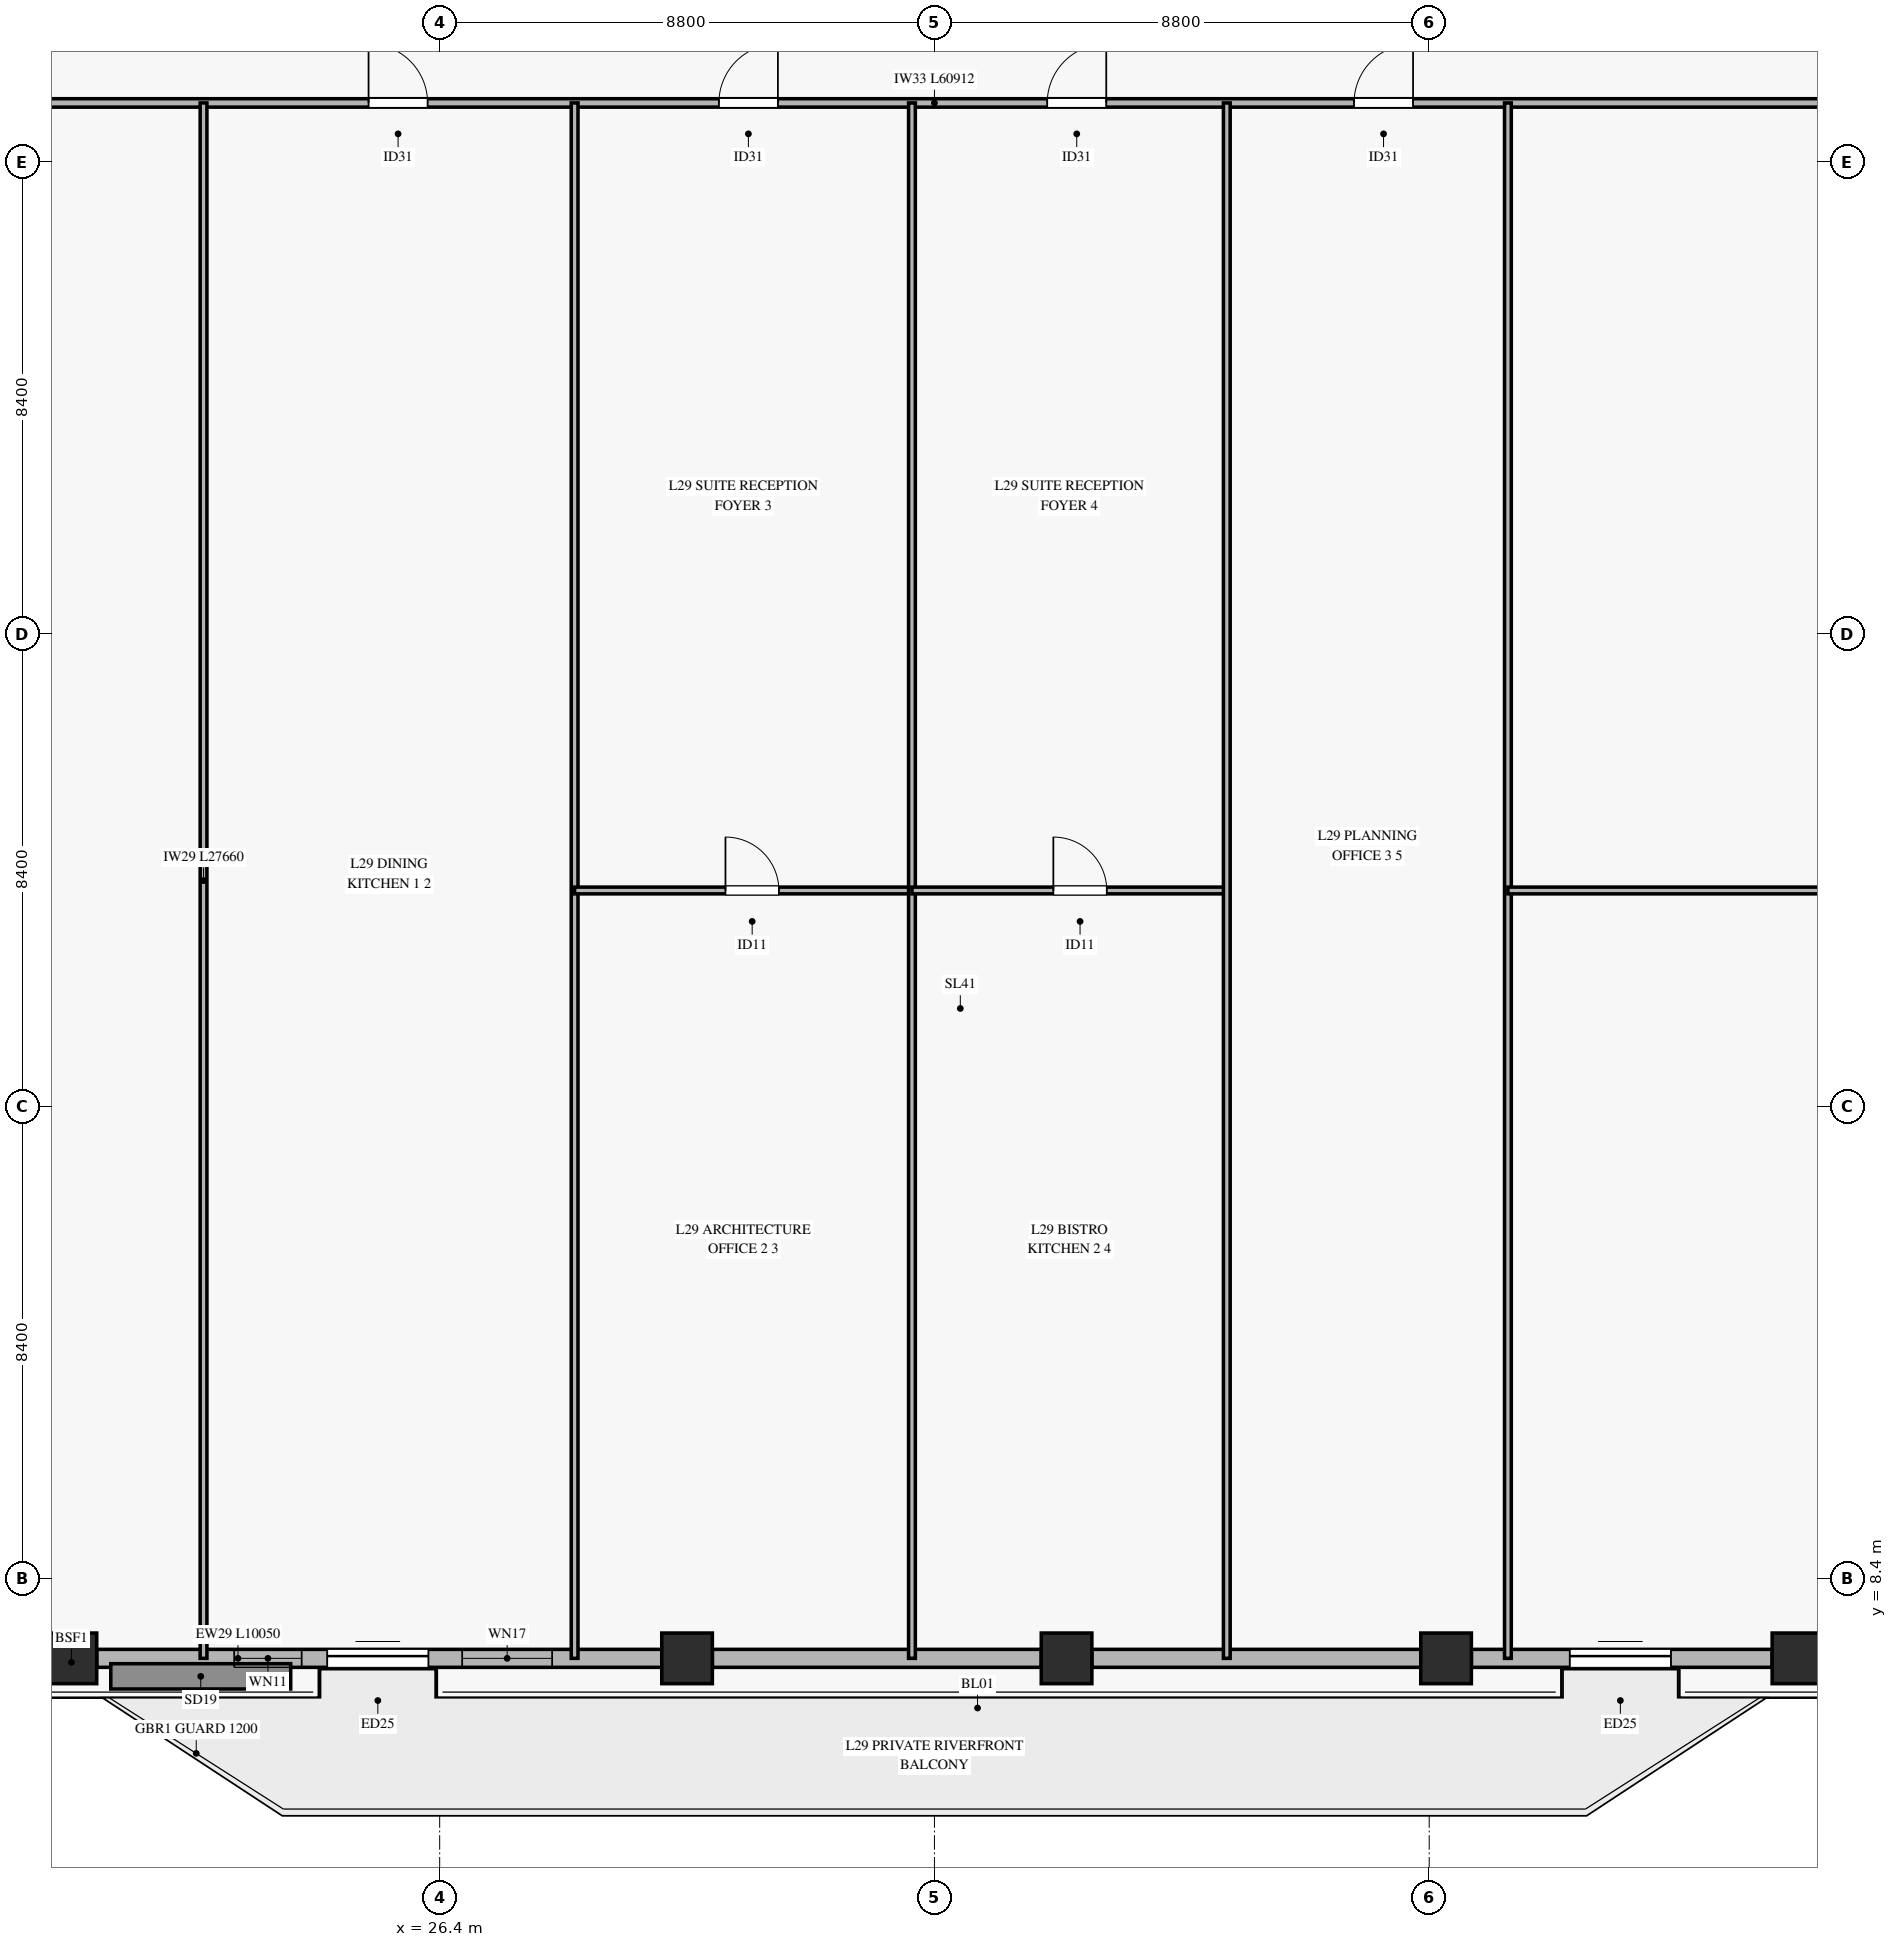
"""IFC4 building model, lengths in metres.
Left out: names, types, materials, properties, quantities, classifications, styles, units other than length and angle.
Written with IfcOpenShell. Run it as: python <this file> out.ifc"""

import sys

from ifc_helpers import new_model, si_unit, direction, frame, frame_2d, origin, origin_2d, place, context, subcontext, project, spatial, rectangle, hollow_rectangle, extrude, source, transform, mapped, element, fill, save


model = new_model("IFC4")
c1 = context("Model", 3, precision=1e-05, world=origin(), true_north=direction((0.0, 1.0)))
c2 = subcontext(c1, "Body", "Model", "MODEL_VIEW")
j1 = project(units=[si_unit("LENGTHUNIT", "METRE"), si_unit("PLANEANGLEUNIT", "RADIAN")], contexts=[c1])
p1 = place(None, origin())
s1 = spatial("IfcSite", under=j1, at=p1, CompositionType="ELEMENT")
p2 = place(p1, origin())
s2 = spatial("IfcBuilding", under=s1, at=p2, CompositionType="ELEMENT")
p3 = place(p2, frame((0.0, 0.0, 119.2)))
s3 = spatial("IfcBuildingStorey", under=s2, at=p3, CompositionType="ELEMENT", Elevation=119.2)
m1 = source(origin(), c2, "Body", "SweptSolid", [
    extrude(hollow_rectangle(XDim=0.9, YDim=0.9, WallThickness=0.04, at=origin_2d()), origin(), (0.0, 0.0, 1.0), 3.718),
])
for number, where, z_axis, x_axis in (
    (1, (19.85, 6.99, 0.0), (0.0, 0.142, 0.99), (-1.0, 0.0, 0.0)),
    (2, (30.8, 6.99, 0.0), (0.0, 0.142, 0.99), (-1.0, 0.0, 0.0)),
    (3, (37.55, 6.99, 0.0), (0.0, 0.142, 0.99), (-1.0, 0.0, 0.0)),
    (4, (44.3, 6.99, 0.0), (0.0, 0.142, 0.99), (-1.0, 0.0, 0.0)),
    (5, (50.55, 6.99, 0.0), (0.0, 0.142, 0.99), (-1.0, 0.0, 0.0)),
):
    element("IfcColumn", number, at=place(p3, frame(where, z_axis=z_axis, x_axis=x_axis)), inside=s3, PredefinedType="COLUMN", context=c2, shape_type="MappedRepresentation", body=[
        mapped(m1, transform((0.0, 0.0, 0.0), x_axis=(1.0, 0.0, 0.0), y_axis=(0.0, 1.0, 0.0), z_axis=(0.0, 0.0, 1.0), scale=1.0)),
    ])
p4 = place(p3, frame((20.3, 6.99, 0.0), z_axis=(0.0, 0.0, 1.0), x_axis=(1.0, 0.0, 0.0)))
e6 = element("IfcWall", 6, at=p4, inside=s3, PredefinedType="SOLIDWALL", context=c2, shape_type="SweptSolid", body=[
    extrude(rectangle(XDim=10.05, YDim=0.32, at=frame_2d((5.025, 0.0))), origin(), (0.0, 0.0, 1.0), 3.16),
])
p5 = place(p4, frame((4.1, 0.0, 0.0)))
e7 = element("IfcOpeningElement", 7, at=p5, cuts=e6, PredefinedType="OPENING", context=c2, shape_type="SweptSolid", body=[
    extrude(rectangle(XDim=1.8, YDim=2.25, at=frame_2d((0.9, 1.125))), frame((0.0, 0.17, 0.0), z_axis=(0.0, -1.0, 0.0), x_axis=(1.0, 0.0, 0.0)), (0.0, 0.0, 1.0), 0.34),
])
p6 = place(p4, frame((2.445, 0.0, 0.45)))
e8 = element("IfcOpeningElement", 8, at=p6, cuts=e6, PredefinedType="OPENING", context=c2, shape_type="SweptSolid", body=[
    extrude(rectangle(XDim=1.2, YDim=2.0, at=frame_2d((0.6, 1.0))), frame((0.0, 0.17, 0.0), z_axis=(0.0, -1.0, 0.0), x_axis=(1.0, 0.0, 0.0)), (0.0, 0.0, 1.0), 0.34),
])
p7 = place(p4, frame((6.5, 0.0, 0.45)))
e9 = element("IfcOpeningElement", 9, at=p7, cuts=e6, PredefinedType="OPENING", context=c2, shape_type="SweptSolid", body=[
    extrude(rectangle(XDim=1.6, YDim=2.0, at=frame_2d((0.8, 1.0))), frame((0.0, 0.17, 0.0), z_axis=(0.0, -1.0, 0.0), x_axis=(1.0, 0.0, 0.0)), (0.0, 0.0, 1.0), 0.34),
])
for number, where, z_axis, x_axis in (
    (10, (31.25, 6.99, 0.0), (0.0, 0.0, 1.0), (1.0, 0.0, 0.0)),
    (11, (38.0, 6.99, 0.0), (0.0, 0.0, 1.0), (1.0, 0.0, 0.0)),
):
    element("IfcWall", number, at=place(p3, frame(where, z_axis=z_axis, x_axis=x_axis)), inside=s3, PredefinedType="SOLIDWALL", context=c2, shape_type="SweptSolid", body=[
        extrude(rectangle(XDim=5.85, YDim=0.32, at=frame_2d((2.925, 0.0))), origin(), (0.0, 0.0, 1.0), 3.16),
    ])
p8 = place(p3, frame((44.75, 6.99, 0.0), z_axis=(0.0, 0.0, 1.0), x_axis=(1.0, 0.0, 0.0)))
e12 = element("IfcWall", 12, at=p8, inside=s3, PredefinedType="SOLIDWALL", context=c2, shape_type="SweptSolid", body=[
    extrude(rectangle(XDim=5.35, YDim=0.32, at=frame_2d((2.675, 0.0))), origin(), (0.0, 0.0, 1.0), 3.16),
])
p9 = place(p8, frame((1.75, 0.0, 0.0)))
e13 = element("IfcOpeningElement", 13, at=p9, cuts=e12, PredefinedType="OPENING", context=c2, shape_type="SweptSolid", body=[
    extrude(rectangle(XDim=1.8, YDim=2.25, at=frame_2d((0.9, 1.125))), frame((0.0, 0.17, 0.0), z_axis=(0.0, -1.0, 0.0), x_axis=(1.0, 0.0, 0.0)), (0.0, 0.0, 1.0), 0.34),
])
p10 = place(p3, frame((4.744, 34.65, 0.0), z_axis=(0.0, 0.0, 1.0), x_axis=(1.0, 0.0, 0.0)))
e14 = element("IfcWall", 14, at=p10, inside=s3, PredefinedType="PARTITIONING", context=c2, shape_type="SweptSolid", body=[
    extrude(rectangle(XDim=60.912, YDim=0.15, at=frame_2d((30.456, 0.0))), origin(), (0.0, 0.0, 1.0), 2.765),
])
p11 = place(p10, frame((7.747, 0.0, 0.0)))
e15 = element("IfcOpeningElement", 15, at=p11, cuts=e14, PredefinedType="OPENING", context=c2, shape_type="SweptSolid", body=[
    extrude(rectangle(XDim=1.05, YDim=2.15, at=frame_2d((0.525, 1.075))), frame((0.0, 0.085, 0.0), z_axis=(0.0, -1.0, 0.0), x_axis=(1.0, 0.0, 0.0)), (0.0, 0.0, 1.0), 0.17),
])
p12 = place(p10, frame((20.391, 0.0, 0.0)))
e16 = element("IfcOpeningElement", 16, at=p12, cuts=e14, PredefinedType="OPENING", context=c2, shape_type="SweptSolid", body=[
    extrude(rectangle(XDim=1.05, YDim=2.15, at=frame_2d((0.525, 1.075))), frame((0.0, 0.085, 0.0), z_axis=(0.0, -1.0, 0.0), x_axis=(1.0, 0.0, 0.0)), (0.0, 0.0, 1.0), 0.17),
])
p13 = place(p10, frame((26.622, 0.0, 0.0)))
e17 = element("IfcOpeningElement", 17, at=p13, cuts=e14, PredefinedType="OPENING", context=c2, shape_type="SweptSolid", body=[
    extrude(rectangle(XDim=1.05, YDim=2.15, at=frame_2d((0.525, 1.075))), frame((0.0, 0.085, 0.0), z_axis=(0.0, -1.0, 0.0), x_axis=(1.0, 0.0, 0.0)), (0.0, 0.0, 1.0), 0.17),
])
p14 = place(p10, frame((32.462, 0.0, 0.0)))
e18 = element("IfcOpeningElement", 18, at=p14, cuts=e14, PredefinedType="OPENING", context=c2, shape_type="SweptSolid", body=[
    extrude(rectangle(XDim=1.05, YDim=2.15, at=frame_2d((0.525, 1.075))), frame((0.0, 0.085, 0.0), z_axis=(0.0, -1.0, 0.0), x_axis=(1.0, 0.0, 0.0)), (0.0, 0.0, 1.0), 0.17),
])
p15 = place(p10, frame((37.919, 0.0, 0.0)))
e19 = element("IfcOpeningElement", 19, at=p15, cuts=e14, PredefinedType="OPENING", context=c2, shape_type="SweptSolid", body=[
    extrude(rectangle(XDim=1.05, YDim=2.15, at=frame_2d((0.525, 1.075))), frame((0.0, 0.085, 0.0), z_axis=(0.0, -1.0, 0.0), x_axis=(1.0, 0.0, 0.0)), (0.0, 0.0, 1.0), 0.17),
])
p16 = place(p10, frame((48.75, 0.0, 0.0)))
e20 = element("IfcOpeningElement", 20, at=p16, cuts=e14, PredefinedType="OPENING", context=c2, shape_type="SweptSolid", body=[
    extrude(rectangle(XDim=1.05, YDim=2.15, at=frame_2d((0.525, 1.075))), frame((0.0, 0.085, 0.0), z_axis=(0.0, -1.0, 0.0), x_axis=(1.0, 0.0, 0.0)), (0.0, 0.0, 1.0), 0.17),
])
for number, where, z_axis, x_axis in (
    (21, (22.2, 6.99, 0.0), (0.0, 0.0, 1.0), (0.0, 1.0, 0.0)),
    (22, (28.8, 6.99, 0.0), (0.0, 0.0, 1.0), (0.0, 1.0, 0.0)),
):
    element("IfcWall", number, at=place(p3, frame(where, z_axis=z_axis, x_axis=x_axis)), inside=s3, PredefinedType="PARTITIONING", context=c2, shape_type="SweptSolid", body=[
        extrude(rectangle(XDim=27.66, YDim=0.12, at=frame_2d((13.83, 0.0))), origin(), (0.0, 0.0, 1.0), 3.165),
    ])
p17 = place(p3, frame((28.8, 20.645, 0.0), z_axis=(0.0, 0.0, 1.0), x_axis=(1.0, 0.0, 0.0)))
e23 = element("IfcWall", 23, at=p17, inside=s3, PredefinedType="PARTITIONING", context=c2, shape_type="SweptSolid", body=[
    extrude(rectangle(XDim=6.0, YDim=0.12, at=frame_2d((3.0, 0.0))), origin(), (0.0, 0.0, 1.0), 2.765),
])
p18 = place(p17, frame((2.683, 0.0, 0.0)))
e24 = element("IfcOpeningElement", 24, at=p18, cuts=e23, PredefinedType="OPENING", context=c2, shape_type="SweptSolid", body=[
    extrude(rectangle(XDim=0.95, YDim=2.1, at=frame_2d((0.475, 1.05))), frame((0.0, 0.07, 0.0), z_axis=(0.0, -1.0, 0.0), x_axis=(1.0, 0.0, 0.0)), (0.0, 0.0, 1.0), 0.14),
])
p19 = place(p3, frame((34.8, 6.99, 0.0), z_axis=(0.0, 0.0, 1.0), x_axis=(0.0, 1.0, 0.0)))
e25 = element("IfcWall", 25, at=p19, inside=s3, PredefinedType="PARTITIONING", context=c2, shape_type="SweptSolid", body=[
    extrude(rectangle(XDim=27.66, YDim=0.12, at=frame_2d((13.83, 0.0))), origin(), (0.0, 0.0, 1.0), 3.165),
])
p20 = place(p3, frame((34.8, 20.645, 0.0), z_axis=(0.0, 0.0, 1.0), x_axis=(1.0, 0.0, 0.0)))
e26 = element("IfcWall", 26, at=p20, inside=s3, PredefinedType="PARTITIONING", context=c2, shape_type="SweptSolid", body=[
    extrude(rectangle(XDim=5.6, YDim=0.12, at=frame_2d((2.8, 0.0))), origin(), (0.0, 0.0, 1.0), 2.765),
])
p21 = place(p20, frame((2.515, 0.0, 0.0)))
e27 = element("IfcOpeningElement", 27, at=p21, cuts=e26, PredefinedType="OPENING", context=c2, shape_type="SweptSolid", body=[
    extrude(rectangle(XDim=0.95, YDim=2.1, at=frame_2d((0.475, 1.05))), frame((0.0, 0.07, 0.0), z_axis=(0.0, -1.0, 0.0), x_axis=(1.0, 0.0, 0.0)), (0.0, 0.0, 1.0), 0.14),
])
for number, where, z_axis, x_axis in (
    (28, (40.4, 6.99, 0.0), (0.0, 0.0, 1.0), (0.0, 1.0, 0.0)),
    (29, (45.4, 6.99, 0.0), (0.0, 0.0, 1.0), (0.0, 1.0, 0.0)),
):
    element("IfcWall", number, at=place(p3, frame(where, z_axis=z_axis, x_axis=x_axis)), inside=s3, PredefinedType="PARTITIONING", context=c2, shape_type="SweptSolid", body=[
        extrude(rectangle(XDim=27.66, YDim=0.12, at=frame_2d((13.83, 0.0))), origin(), (0.0, 0.0, 1.0), 3.165),
    ])
p22 = place(p3, frame((45.4, 20.645, 0.0), z_axis=(0.0, 0.0, 1.0), x_axis=(1.0, 0.0, 0.0)))
e30 = element("IfcWall", 30, at=p22, inside=s3, PredefinedType="PARTITIONING", context=c2, shape_type="SweptSolid", body=[
    extrude(rectangle(XDim=20.256, YDim=0.12, at=frame_2d((10.128, 0.0))), origin(), (0.0, 0.0, 1.0), 2.765),
])
p23 = place(p22, frame((8.488, 0.0, 0.0)))
e31 = element("IfcOpeningElement", 31, at=p23, cuts=e30, PredefinedType="OPENING", context=c2, shape_type="SweptSolid", body=[
    extrude(rectangle(XDim=0.95, YDim=2.1, at=frame_2d((0.475, 1.05))), frame((0.0, 0.07, 0.0), z_axis=(0.0, -1.0, 0.0), x_axis=(1.0, 0.0, 0.0)), (0.0, 0.0, 1.0), 0.14),
])
m2 = source(origin(), c2, "Body", "SweptSolid", [
    extrude(rectangle(XDim=1.8, YDim=2.25, at=frame_2d((0.9, 1.125))), frame((0.0, 0.025, 0.0), z_axis=(0.0, -1.0, 0.0), x_axis=(1.0, 0.0, 0.0)), (0.0, 0.0, 1.0), 0.05),
])
p24 = place(p5, origin())
e32 = element("IfcDoor", 32, at=p24, inside=s3, OperationType="SLIDING_TO_LEFT", PredefinedType="DOOR", context=c2, shape_type="MappedRepresentation", body=[
    mapped(m2, transform((0.0, 0.0, 0.0), x_axis=(1.0, 0.0, 0.0), y_axis=(0.0, 1.0, 0.0), z_axis=(0.0, 0.0, 1.0), scale=1.0)),
])
fill(e7, e32)
m3 = source(origin(), c2, "Body", "SweptSolid", [
    extrude(rectangle(XDim=1.2, YDim=2.0, at=frame_2d((0.6, 1.0))), frame((0.0, 0.03, 0.0), z_axis=(0.0, -1.0, 0.0), x_axis=(1.0, 0.0, 0.0)), (0.0, 0.0, 1.0), 0.06),
])
p25 = place(p6, origin())
e33 = element("IfcWindow", 33, at=p25, inside=s3, PartitioningType="SINGLE_PANEL", PredefinedType="WINDOW", context=c2, shape_type="MappedRepresentation", body=[
    mapped(m3, transform((0.0, 0.0, 0.0), x_axis=(1.0, 0.0, 0.0), y_axis=(0.0, 1.0, 0.0), z_axis=(0.0, 0.0, 1.0), scale=1.0)),
])
fill(e8, e33)
m4 = source(origin(), c2, "Body", "SweptSolid", [
    extrude(rectangle(XDim=1.6, YDim=2.0, at=frame_2d((0.8, 1.0))), frame((0.0, 0.03, 0.0), z_axis=(0.0, -1.0, 0.0), x_axis=(1.0, 0.0, 0.0)), (0.0, 0.0, 1.0), 0.06),
])
p26 = place(p7, origin())
e34 = element("IfcWindow", 34, at=p26, inside=s3, PartitioningType="SINGLE_PANEL", PredefinedType="WINDOW", context=c2, shape_type="MappedRepresentation", body=[
    mapped(m4, transform((0.0, 0.0, 0.0), x_axis=(1.0, 0.0, 0.0), y_axis=(0.0, 1.0, 0.0), z_axis=(0.0, 0.0, 1.0), scale=1.0)),
])
fill(e9, e34)
p27 = place(p9, origin())
e35 = element("IfcDoor", 35, at=p27, inside=s3, OperationType="SLIDING_TO_LEFT", PredefinedType="DOOR", context=c2, shape_type="MappedRepresentation", body=[
    mapped(m2, transform((0.0, 0.0, 0.0), x_axis=(1.0, 0.0, 0.0), y_axis=(0.0, 1.0, 0.0), z_axis=(0.0, 0.0, 1.0), scale=1.0)),
])
fill(e13, e35)
m5 = source(origin(), c2, "Body", "SweptSolid", [
    extrude(rectangle(XDim=1.05, YDim=2.15, at=frame_2d((0.525, 1.075))), frame((0.0, 0.025, 0.0), z_axis=(0.0, -1.0, 0.0), x_axis=(1.0, 0.0, 0.0)), (0.0, 0.0, 1.0), 0.05),
])
p28 = place(p12, origin())
e36 = element("IfcDoor", 36, at=p28, inside=s3, OperationType="SINGLE_SWING_LEFT", PredefinedType="DOOR", context=c2, shape_type="MappedRepresentation", body=[
    mapped(m5, transform((0.0, 0.0, 0.0), x_axis=(1.0, 0.0, 0.0), y_axis=(0.0, 1.0, 0.0), z_axis=(0.0, 0.0, 1.0), scale=1.0)),
])
fill(e16, e36)
p29 = place(p13, origin())
e37 = element("IfcDoor", 37, at=p29, inside=s3, OperationType="SINGLE_SWING_RIGHT", PredefinedType="DOOR", context=c2, shape_type="MappedRepresentation", body=[
    mapped(m5, transform((0.0, 0.0, 0.0), x_axis=(1.0, 0.0, 0.0), y_axis=(0.0, 1.0, 0.0), z_axis=(0.0, 0.0, 1.0), scale=1.0)),
])
fill(e17, e37)
m6 = source(origin(), c2, "Body", "SweptSolid", [
    extrude(rectangle(XDim=0.95, YDim=2.1, at=frame_2d((0.475, 1.05))), frame((0.0, 0.025, 0.0), z_axis=(0.0, -1.0, 0.0), x_axis=(1.0, 0.0, 0.0)), (0.0, 0.0, 1.0), 0.05),
])
p30 = place(p18, origin())
e38 = element("IfcDoor", 38, at=p30, inside=s3, OperationType="SINGLE_SWING_LEFT", PredefinedType="DOOR", context=c2, shape_type="MappedRepresentation", body=[
    mapped(m6, transform((0.0, 0.0, 0.0), x_axis=(1.0, 0.0, 0.0), y_axis=(0.0, 1.0, 0.0), z_axis=(0.0, 0.0, 1.0), scale=1.0)),
])
fill(e24, e38)
p31 = place(p14, origin())
e39 = element("IfcDoor", 39, at=p31, inside=s3, OperationType="SINGLE_SWING_RIGHT", PredefinedType="DOOR", context=c2, shape_type="MappedRepresentation", body=[
    mapped(m5, transform((0.0, 0.0, 0.0), x_axis=(1.0, 0.0, 0.0), y_axis=(0.0, 1.0, 0.0), z_axis=(0.0, 0.0, 1.0), scale=1.0)),
])
fill(e18, e39)
p32 = place(p21, origin())
e40 = element("IfcDoor", 40, at=p32, inside=s3, OperationType="SINGLE_SWING_LEFT", PredefinedType="DOOR", context=c2, shape_type="MappedRepresentation", body=[
    mapped(m6, transform((0.0, 0.0, 0.0), x_axis=(1.0, 0.0, 0.0), y_axis=(0.0, 1.0, 0.0), z_axis=(0.0, 0.0, 1.0), scale=1.0)),
])
fill(e27, e40)
p33 = place(p15, origin())
e41 = element("IfcDoor", 41, at=p33, inside=s3, OperationType="SINGLE_SWING_RIGHT", PredefinedType="DOOR", context=c2, shape_type="MappedRepresentation", body=[
    mapped(m5, transform((0.0, 0.0, 0.0), x_axis=(1.0, 0.0, 0.0), y_axis=(0.0, 1.0, 0.0), z_axis=(0.0, 0.0, 1.0), scale=1.0)),
])
fill(e19, e41)
save(model, sys.argv[1])
